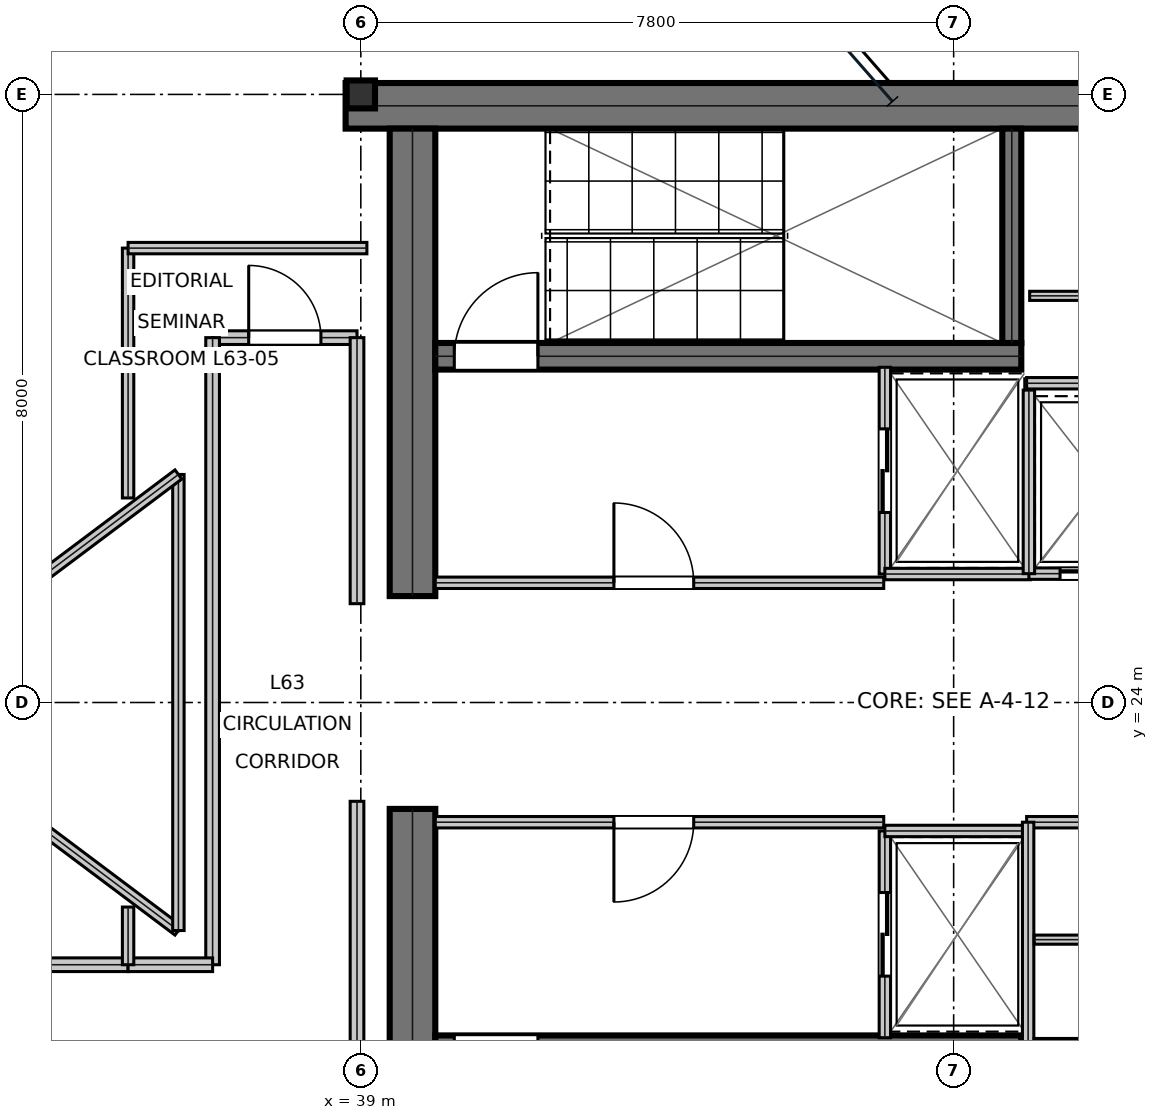
"""IFC4 building model, lengths in metres.
Left out: names, types, materials, properties, quantities, classifications, styles, units other than length and angle.
Written with IfcOpenShell. Run it as: python <this file> out.ifc"""

import sys

from ifc_helpers import new_model, si_unit, direction, frame, frame_2d, origin, origin_2d, place, context, subcontext, project, spatial, rectangle, i_section, extrude, element, fill, save


model = new_model("IFC4")
c1 = context("Model", 3, precision=1e-05, world=origin(), true_north=direction((0.0, 1.0)))
c2 = subcontext(c1, "Body", "Model", "MODEL_VIEW")
j1 = project(units=[si_unit("LENGTHUNIT", "METRE"), si_unit("PLANEANGLEUNIT", "RADIAN")], contexts=[c1])
p1 = place(None, origin())
s1 = spatial("IfcSite", under=j1, at=p1, CompositionType="ELEMENT")
p2 = place(p1, origin())
s2 = spatial("IfcBuilding", under=s1, at=p2, CompositionType="ELEMENT")
p3 = place(p2, frame((0.0, 0.0, 270.9)))
s3 = spatial("IfcBuildingStorey", under=s2, at=p3, CompositionType="ELEMENT", Elevation=270.9)
p4 = place(p3, frame((38.8, 31.85, 0.0), z_axis=(0.0, 0.0, 1.0), x_axis=(1.0, 0.0, 0.0)))
e1 = element("IfcWall", 1, at=p4, inside=s3, PredefinedType="SHEAR", context=c2, shape_type="SweptSolid", body=[
    extrude(rectangle(XDim=16.0, YDim=0.6, at=frame_2d((8.0, 0.0))), origin(), (0.0, 0.0, 1.0), 3.81),
])
for number, where, z_axis, x_axis in (
    (2, (39.68, 16.45, 0.0), (0.0, 0.0, 1.0), (0.0, 1.0, 0.0)),
    (3, (39.68, 25.4, 0.0), (0.0, 0.0, 1.0), (0.0, 1.0, 0.0)),
):
    element("IfcWall", number, at=place(p3, frame(where, z_axis=z_axis, x_axis=x_axis)), inside=s3, PredefinedType="SHEAR", context=c2, shape_type="SweptSolid", body=[
        extrude(rectangle(XDim=6.15, YDim=0.6, at=frame_2d((3.075, 0.0))), origin(), (0.0, 0.0, 1.0), 3.81),
    ])
p5 = place(p3, frame((39.98, 28.555, 0.0), z_axis=(0.0, 0.0, 1.0), x_axis=(1.0, 0.0, 0.0)))
e4 = element("IfcWall", 4, at=p5, inside=s3, PredefinedType="SHEAR", context=c2, shape_type="SweptSolid", body=[
    extrude(rectangle(XDim=7.71, YDim=0.35, at=frame_2d((3.855, 0.0))), origin(), (0.0, 0.0, 1.0), 3.81),
])
p6 = place(p5, frame((0.25, 0.0, 0.0)))
e5 = element("IfcOpeningElement", 5, at=p6, cuts=e4, PredefinedType="OPENING", context=c2, shape_type="SweptSolid", body=[
    extrude(rectangle(XDim=1.1, YDim=2.15, at=frame_2d((0.55, 1.075))), frame((0.0, 0.185, 0.0), z_axis=(0.0, -1.0, 0.0), x_axis=(1.0, 0.0, 0.0)), (0.0, 0.0, 1.0), 0.37),
])
p7 = place(p3, frame((39.98, 19.445, 0.0), z_axis=(0.0, 0.0, 1.0), x_axis=(1.0, 0.0, 0.0)))
e6 = element("IfcWall", 6, at=p7, inside=s3, PredefinedType="SHEAR", context=c2, shape_type="SweptSolid", body=[
    extrude(rectangle(XDim=7.71, YDim=0.35, at=frame_2d((3.855, 0.0))), origin(), (0.0, 0.0, 1.0), 3.81),
])
p8 = place(p7, frame((0.25, 0.0, 0.0)))
e7 = element("IfcOpeningElement", 7, at=p8, cuts=e6, PredefinedType="OPENING", context=c2, shape_type="SweptSolid", body=[
    extrude(rectangle(XDim=1.1, YDim=2.15, at=frame_2d((0.55, 1.075))), frame((0.0, 0.185, 0.0), z_axis=(0.0, -1.0, 0.0), x_axis=(1.0, 0.0, 0.0)), (0.0, 0.0, 1.0), 0.37),
])
p9 = place(p3, frame((47.565, 28.73, 0.0), z_axis=(0.0, 0.0, 1.0), x_axis=(0.0, 1.0, 0.0)))
e8 = element("IfcWall", 8, at=p9, inside=s3, PredefinedType="SHEAR", context=c2, shape_type="SweptSolid", body=[
    extrude(rectangle(XDim=2.82, YDim=0.25, at=frame_2d((1.41, 0.0))), origin(), (0.0, 0.0, 1.0), 3.81),
])
p10 = place(p3, frame((39.0, 32.0, 0.0), z_axis=(0.0, 0.0, 1.0), x_axis=(1.0, 0.0, 0.0)))
e9 = element("IfcColumn", 9, at=p10, inside=s3, PredefinedType="COLUMN", context=c2, shape_type="SweptSolid", body=[
    extrude(i_section(OverallWidth=0.373, OverallDepth=0.368, WebThickness=0.015, FlangeThickness=0.024, at=origin_2d()), origin(), (0.0, 0.0, 1.0), 4.044),
])
p11 = place(p3, frame((39.98, 25.575, 0.0), z_axis=(0.0, 0.0, 1.0), x_axis=(1.0, 0.0, 0.0)))
e10 = element("IfcWall", 10, at=p11, inside=s3, PredefinedType="PARTITIONING", context=c2, shape_type="SweptSolid", body=[
    extrude(rectangle(XDim=5.9, YDim=0.15, at=frame_2d((2.95, 0.0))), origin(), (0.0, 0.0, 1.0), 3.81),
])
p12 = place(p11, frame((2.35, 0.0, 0.0)))
e11 = element("IfcOpeningElement", 11, at=p12, cuts=e10, PredefinedType="OPENING", context=c2, shape_type="SweptSolid", body=[
    extrude(rectangle(XDim=1.05, YDim=2.15, at=frame_2d((0.525, 1.075))), frame((0.0, 0.085, 0.0), z_axis=(0.0, -1.0, 0.0), x_axis=(1.0, 0.0, 0.0)), (0.0, 0.0, 1.0), 0.17),
])
p13 = place(p3, frame((39.98, 22.425, 0.0), z_axis=(0.0, 0.0, 1.0), x_axis=(1.0, 0.0, 0.0)))
e12 = element("IfcWall", 12, at=p13, inside=s3, PredefinedType="PARTITIONING", context=c2, shape_type="SweptSolid", body=[
    extrude(rectangle(XDim=5.9, YDim=0.15, at=frame_2d((2.95, 0.0))), origin(), (0.0, 0.0, 1.0), 3.81),
])
p14 = place(p13, frame((2.35, 0.0, 0.0)))
e13 = element("IfcOpeningElement", 13, at=p14, cuts=e12, PredefinedType="OPENING", context=c2, shape_type="SweptSolid", body=[
    extrude(rectangle(XDim=1.05, YDim=2.15, at=frame_2d((0.525, 1.075))), frame((0.0, 0.085, 0.0), z_axis=(0.0, -1.0, 0.0), x_axis=(1.0, 0.0, 0.0)), (0.0, 0.0, 1.0), 0.17),
])
p15 = place(p3, frame((45.895, 25.69, 0.0), z_axis=(0.0, 0.0, 1.0), x_axis=(0.0, 1.0, 0.0)))
e14 = element("IfcWall", 14, at=p15, inside=s3, PredefinedType="PARTITIONING", context=c2, shape_type="SweptSolid", body=[
    extrude(rectangle(XDim=2.72, YDim=0.15, at=frame_2d((1.36, 0.0))), origin(), (0.0, 0.0, 1.0), 3.81),
])
p16 = place(p15, frame((0.81, 0.0, 0.0)))
e15 = element("IfcOpeningElement", 15, at=p16, cuts=e14, PredefinedType="OPENING", context=c2, shape_type="SweptSolid", body=[
    extrude(rectangle(XDim=1.1, YDim=2.15, at=frame_2d((0.55, 1.075))), frame((0.0, 0.085, 0.0), z_axis=(0.0, -1.0, 0.0), x_axis=(1.0, 0.0, 0.0)), (0.0, 0.0, 1.0), 0.17),
])
p17 = place(p3, frame((45.895, 25.69, 0.0), z_axis=(0.0, 0.0, 1.0), x_axis=(1.0, 0.0, 0.0)))
e16 = element("IfcWall", 16, at=p17, inside=s3, PredefinedType="PARTITIONING", context=c2, shape_type="SweptSolid", body=[
    extrude(rectangle(XDim=1.915, YDim=0.15, at=frame_2d((0.958, 0.0))), origin(), (0.0, 0.0, 1.0), 3.81),
])
p18 = place(p3, frame((45.895, 19.59, 0.0), z_axis=(0.0, 0.0, 1.0), x_axis=(0.0, 1.0, 0.0)))
e17 = element("IfcWall", 17, at=p18, inside=s3, PredefinedType="PARTITIONING", context=c2, shape_type="SweptSolid", body=[
    extrude(rectangle(XDim=2.72, YDim=0.15, at=frame_2d((1.36, 0.0))), origin(), (0.0, 0.0, 1.0), 3.81),
])
p19 = place(p18, frame((0.81, 0.0, 0.0)))
e18 = element("IfcOpeningElement", 18, at=p19, cuts=e17, PredefinedType="OPENING", context=c2, shape_type="SweptSolid", body=[
    extrude(rectangle(XDim=1.1, YDim=2.15, at=frame_2d((0.55, 1.075))), frame((0.0, 0.085, 0.0), z_axis=(0.0, -1.0, 0.0), x_axis=(1.0, 0.0, 0.0)), (0.0, 0.0, 1.0), 0.17),
])
p20 = place(p3, frame((45.895, 22.31, 0.0), z_axis=(0.0, 0.0, 1.0), x_axis=(1.0, 0.0, 0.0)))
e19 = element("IfcWall", 19, at=p20, inside=s3, PredefinedType="PARTITIONING", context=c2, shape_type="SweptSolid", body=[
    extrude(rectangle(XDim=1.915, YDim=0.15, at=frame_2d((0.958, 0.0))), origin(), (0.0, 0.0, 1.0), 3.81),
])
p21 = place(p3, frame((47.79, 25.695, 0.0), z_axis=(0.0, 0.0, 1.0), x_axis=(1.0, 0.0, 0.0)))
e20 = element("IfcWall", 20, at=p21, inside=s3, PredefinedType="PARTITIONING", context=c2, shape_type="SweptSolid", body=[
    extrude(rectangle(XDim=1.92, YDim=0.15, at=frame_2d((0.96, 0.0))), origin(), (0.0, 0.0, 1.0), 3.81),
])
p22 = place(p21, frame((0.41, 0.0, 0.0)))
e21 = element("IfcOpeningElement", 21, at=p22, cuts=e20, PredefinedType="OPENING", context=c2, shape_type="SweptSolid", body=[
    extrude(rectangle(XDim=1.1, YDim=2.15, at=frame_2d((0.55, 1.075))), frame((0.0, 0.085, 0.0), z_axis=(0.0, -1.0, 0.0), x_axis=(1.0, 0.0, 0.0)), (0.0, 0.0, 1.0), 0.17),
])
p23 = place(p3, frame((47.79, 25.695, 0.0), z_axis=(0.0, 0.0, 1.0), x_axis=(0.0, 1.0, 0.0)))
e22 = element("IfcWall", 22, at=p23, inside=s3, PredefinedType="PARTITIONING", context=c2, shape_type="SweptSolid", body=[
    extrude(rectangle(XDim=2.415, YDim=0.15, at=frame_2d((1.208, 0.0))), origin(), (0.0, 0.0, 1.0), 3.81),
])
p24 = place(p3, frame((47.76, 22.425, 0.0), z_axis=(0.0, 0.0, 1.0), x_axis=(1.0, 0.0, 0.0)))
e23 = element("IfcWall", 23, at=p24, inside=s3, PredefinedType="PARTITIONING", context=c2, shape_type="SweptSolid", body=[
    extrude(rectangle(XDim=1.96, YDim=0.15, at=frame_2d((0.98, 0.0))), origin(), (0.0, 0.0, 1.0), 3.81),
])
p25 = place(p3, frame((47.78, 16.45, 0.0), z_axis=(0.0, 0.0, 1.0), x_axis=(0.0, 1.0, 0.0)))
e24 = element("IfcWall", 24, at=p25, inside=s3, PredefinedType="PARTITIONING", context=c2, shape_type="SweptSolid", body=[
    extrude(rectangle(XDim=5.975, YDim=0.15, at=frame_2d((2.988, 0.0))), origin(), (0.0, 0.0, 1.0), 3.81),
])
for number, where, z_axis, x_axis in (
    (25, (47.86, 19.52, 0.0), (0.0, 0.0, 1.0), (1.0, 0.0, 0.0)),
    (26, (47.86, 20.88, 0.0), (0.0, 0.0, 1.0), (1.0, 0.0, 0.0)),
):
    element("IfcWall", number, at=place(p3, frame(where, z_axis=z_axis, x_axis=x_axis)), inside=s3, PredefinedType="PARTITIONING", context=c2, shape_type="SweptSolid", body=[
        extrude(rectangle(XDim=1.76, YDim=0.12, at=frame_2d((0.88, 0.0))), origin(), (0.0, 0.0, 1.0), 3.81),
    ])
p26 = place(p3, frame((47.76, 28.2, 0.0), z_axis=(0.0, 0.0, 1.0), x_axis=(1.0, 0.0, 0.0)))
e27 = element("IfcWall", 27, at=p26, inside=s3, PredefinedType="PARTITIONING", context=c2, shape_type="SweptSolid", body=[
    extrude(rectangle(XDim=2.04, YDim=0.15, at=frame_2d((1.02, 0.0))), origin(), (0.0, 0.0, 1.0), 3.81),
])
p27 = place(p3, frame((47.8, 29.35, 0.0), z_axis=(0.0, 0.0, 1.0), x_axis=(1.0, 0.0, 0.0)))
e28 = element("IfcWall", 28, at=p27, inside=s3, PredefinedType="PARTITIONING", context=c2, shape_type="SweptSolid", body=[
    extrude(rectangle(XDim=5.86, YDim=0.12, at=frame_2d((2.93, 0.0))), origin(), (0.0, 0.0, 1.0), 3.81),
])
p28 = place(p27, frame((2.6, 0.0, 0.0)))
e29 = element("IfcOpeningElement", 29, at=p28, cuts=e28, PredefinedType="OPENING", context=c2, shape_type="SweptSolid", body=[
    extrude(rectangle(XDim=0.85, YDim=2.15, at=frame_2d((0.425, 1.075))), frame((0.0, 0.07, 0.0), z_axis=(0.0, -1.0, 0.0), x_axis=(1.0, 0.0, 0.0)), (0.0, 0.0, 1.0), 0.14),
])
p29 = place(p3, frame((37.05, 28.8, 0.0), z_axis=(0.0, 0.0, 1.0), x_axis=(1.0, 0.0, 0.0)))
e30 = element("IfcWall", 30, at=p29, inside=s3, PredefinedType="SOLIDWALL", context=c2, shape_type="SweptSolid", body=[
    extrude(rectangle(XDim=1.9, YDim=0.18, at=frame_2d((0.95, 0.0))), origin(), (0.0, 0.0, 1.0), 3.81),
])
p30 = place(p29, frame((0.475, 0.0, 0.0)))
e31 = element("IfcOpeningElement", 31, at=p30, cuts=e30, PredefinedType="OPENING", context=c2, shape_type="SweptSolid", body=[
    extrude(rectangle(XDim=0.95, YDim=2.15, at=frame_2d((0.475, 1.075))), frame((0.0, 0.1, 0.0), z_axis=(0.0, -1.0, 0.0), x_axis=(1.0, 0.0, 0.0)), (0.0, 0.0, 1.0), 0.2),
])
p31 = place(p3, frame((25.895, 20.55, 0.0), z_axis=(0.0, 0.0, 1.0), x_axis=(1.0, 0.0, 0.0)))
e32 = element("IfcWall", 32, at=p31, inside=s3, PredefinedType="SOLIDWALL", context=c2, shape_type="SweptSolid", body=[
    extrude(rectangle(XDim=10.043, YDim=0.18, at=frame_2d((5.021, 0.0))), origin(), (0.0, 0.0, 1.0), 3.27),
])
p32 = place(p31, frame((4.572, 0.0, 0.0)))
e33 = element("IfcOpeningElement", 33, at=p32, cuts=e32, PredefinedType="OPENING", context=c2, shape_type="SweptSolid", body=[
    extrude(rectangle(XDim=0.9, YDim=2.15, at=frame_2d((0.45, 1.075))), frame((0.0, 0.1, 0.0), z_axis=(0.0, -1.0, 0.0), x_axis=(1.0, 0.0, 0.0)), (0.0, 0.0, 1.0), 0.2),
])
p33 = place(p3, frame((38.95, 18.8, 0.0), z_axis=(0.0, 0.0, 1.0), x_axis=(0.0, 1.0, 0.0)))
e34 = element("IfcWall", 34, at=p33, inside=s3, PredefinedType="SOLIDWALL", context=c2, shape_type="SweptSolid", body=[
    extrude(rectangle(XDim=3.9, YDim=0.18, at=frame_2d((1.95, 0.0))), origin(), (0.0, 0.0, 1.0), 3.54),
])
p34 = place(p3, frame((37.05, 20.55, 0.0), z_axis=(0.0, 0.0, 1.0), x_axis=(0.0, 1.0, 0.0)))
e35 = element("IfcWall", 35, at=p34, inside=s3, PredefinedType="SOLIDWALL", context=c2, shape_type="SweptSolid", body=[
    extrude(rectangle(XDim=8.25, YDim=0.18, at=frame_2d((4.125, 0.0))), origin(), (0.0, 0.0, 1.0), 3.54),
])
p35 = place(p3, frame((38.95, 25.3, 0.0), z_axis=(0.0, 0.0, 1.0), x_axis=(0.0, 1.0, 0.0)))
e36 = element("IfcWall", 36, at=p35, inside=s3, PredefinedType="SOLIDWALL", context=c2, shape_type="SweptSolid", body=[
    extrude(rectangle(XDim=3.5, YDim=0.18, at=frame_2d((1.75, 0.0))), origin(), (0.0, 0.0, 1.0), 3.54),
])
p36 = place(p3, frame((35.938, 20.55, 0.0), z_axis=(0.0, 0.0, 1.0), x_axis=(1.0, 0.0, 0.0)))
e37 = element("IfcWall", 37, at=p36, inside=s3, PredefinedType="SOLIDWALL", context=c2, shape_type="SweptSolid", body=[
    extrude(rectangle(XDim=1.112, YDim=0.18, at=frame_2d((0.556, 0.0))), origin(), (0.0, 0.0, 1.0), 3.54),
])
p37 = place(p3, frame((35.938, 26.691, 0.0), z_axis=(0.0, 0.0, 1.0), x_axis=(0.0, 1.0, 0.0)))
e38 = element("IfcWall", 38, at=p37, inside=s3, PredefinedType="MOVABLE", context=c2, shape_type="SweptSolid", body=[
    extrude(rectangle(XDim=3.287, YDim=0.15, at=frame_2d((1.644, 0.0))), origin(), (0.0, 0.0, 1.0), 3.54),
])
p38 = place(p3, frame((35.938, 29.978, 0.0), z_axis=(0.0, 0.0, 1.0), x_axis=(1.0, 0.0, 0.0)))
e39 = element("IfcWall", 39, at=p38, inside=s3, PredefinedType="MOVABLE", context=c2, shape_type="SweptSolid", body=[
    extrude(rectangle(XDim=3.142, YDim=0.15, at=frame_2d((1.571, 0.0))), origin(), (0.0, 0.0, 1.0), 3.54),
])
p39 = place(p3, frame((35.938, 20.55, 0.0), z_axis=(0.0, 0.0, 1.0), x_axis=(0.0, 1.0, 0.0)))
e40 = element("IfcWall", 40, at=p39, inside=s3, PredefinedType="MOVABLE", context=c2, shape_type="SweptSolid", body=[
    extrude(rectangle(XDim=0.759, YDim=0.15, at=frame_2d((0.379, 0.0))), origin(), (0.0, 0.0, 1.0), 3.81),
])
p40 = place(p3, frame((32.6, 24.0, 0.0), z_axis=(0.0, 0.0, 1.0), x_axis=(0.8, -0.6, 0.0)))
e41 = element("IfcWall", 41, at=p40, inside=s3, PredefinedType="MOVABLE", context=c2, shape_type="SweptSolid", body=[
    extrude(rectangle(XDim=5.0, YDim=0.15, at=frame_2d((2.5, 0.0))), origin(), (0.0, 0.0, 1.0), 3.81),
])
p41 = place(p3, frame((36.6, 21.0, 0.0), z_axis=(0.0, 0.0, 1.0), x_axis=(0.0, 1.0, 0.0)))
e42 = element("IfcWall", 42, at=p41, inside=s3, PredefinedType="MOVABLE", context=c2, shape_type="SweptSolid", body=[
    extrude(rectangle(XDim=6.0, YDim=0.15, at=frame_2d((3.0, 0.0))), origin(), (0.0, 0.0, 1.0), 3.81),
])
p42 = place(p3, frame((36.6, 27.0, 0.0), z_axis=(0.0, 0.0, 1.0), x_axis=(-0.8, -0.6, 0.0)))
e43 = element("IfcWall", 43, at=p42, inside=s3, PredefinedType="MOVABLE", context=c2, shape_type="SweptSolid", body=[
    extrude(rectangle(XDim=5.0, YDim=0.15, at=frame_2d((2.5, 0.0))), origin(), (0.0, 0.0, 1.0), 3.81),
])
p43 = place(p12, origin())
e44 = element("IfcDoor", 44, at=p43, inside=s3, OperationType="SINGLE_SWING_LEFT", PredefinedType="DOOR", context=c2, shape_type="SweptSolid", body=[
    extrude(rectangle(XDim=1.05, YDim=2.15, at=frame_2d((0.525, 1.075))), frame((0.0, 0.025, 0.0), z_axis=(0.0, -1.0, 0.0), x_axis=(1.0, 0.0, 0.0)), (0.0, 0.0, 1.0), 0.05),
])
fill(e11, e44)
p44 = place(p14, frame((1.05, 0.0, 0.0), z_axis=(0.0, 0.0, 1.0), x_axis=(-1.0, 0.0, 0.0)))
e45 = element("IfcDoor", 45, at=p44, inside=s3, OperationType="SINGLE_SWING_RIGHT", PredefinedType="DOOR", context=c2, shape_type="SweptSolid", body=[
    extrude(rectangle(XDim=1.05, YDim=2.15, at=frame_2d((0.525, 1.075))), frame((0.0, 0.025, 0.0), z_axis=(0.0, -1.0, 0.0), x_axis=(1.0, 0.0, 0.0)), (0.0, 0.0, 1.0), 0.05),
])
fill(e13, e45)
p45 = place(p16, frame((1.1, 0.0, 0.0), z_axis=(0.0, 0.0, 1.0), x_axis=(-1.0, 0.0, 0.0)))
e46 = element("IfcDoor", 46, at=p45, inside=s3, OperationType="DOUBLE_DOOR_SLIDING", PredefinedType="DOOR", context=c2, shape_type="SweptSolid", body=[
    extrude(rectangle(XDim=1.1, YDim=2.15, at=frame_2d((0.55, 1.075))), frame((0.0, 0.025, 0.0), z_axis=(0.0, -1.0, 0.0), x_axis=(1.0, 0.0, 0.0)), (0.0, 0.0, 1.0), 0.05),
])
fill(e15, e46)
p46 = place(p19, frame((1.1, 0.0, 0.0), z_axis=(0.0, 0.0, 1.0), x_axis=(-1.0, 0.0, 0.0)))
e47 = element("IfcDoor", 47, at=p46, inside=s3, OperationType="DOUBLE_DOOR_SLIDING", PredefinedType="DOOR", context=c2, shape_type="SweptSolid", body=[
    extrude(rectangle(XDim=1.1, YDim=2.15, at=frame_2d((0.55, 1.075))), frame((0.0, 0.025, 0.0), z_axis=(0.0, -1.0, 0.0), x_axis=(1.0, 0.0, 0.0)), (0.0, 0.0, 1.0), 0.05),
])
fill(e18, e47)
p47 = place(p22, frame((1.1, 0.0, 0.0), z_axis=(0.0, 0.0, 1.0), x_axis=(-1.0, 0.0, 0.0)))
e48 = element("IfcDoor", 48, at=p47, inside=s3, OperationType="DOUBLE_DOOR_SLIDING", PredefinedType="DOOR", context=c2, shape_type="SweptSolid", body=[
    extrude(rectangle(XDim=1.1, YDim=2.15, at=frame_2d((0.55, 1.075))), frame((0.0, 0.025, 0.0), z_axis=(0.0, -1.0, 0.0), x_axis=(1.0, 0.0, 0.0)), (0.0, 0.0, 1.0), 0.05),
])
fill(e21, e48)
p48 = place(p30, origin())
e49 = element("IfcDoor", 49, at=p48, inside=s3, OperationType="SINGLE_SWING_LEFT", PredefinedType="DOOR", context=c2, shape_type="SweptSolid", body=[
    extrude(rectangle(XDim=0.95, YDim=2.15, at=frame_2d((0.475, 1.075))), frame((0.0, 0.025, 0.0), z_axis=(0.0, -1.0, 0.0), x_axis=(1.0, 0.0, 0.0)), (0.0, 0.0, 1.0), 0.05),
])
fill(e31, e49)
p49 = place(p6, origin())
e50 = element("IfcDoor", 50, at=p49, inside=s3, OperationType="SINGLE_SWING_RIGHT", PredefinedType="DOOR", context=c2, shape_type="SweptSolid", body=[
    extrude(rectangle(XDim=1.1, YDim=2.15, at=frame_2d((0.55, 1.075))), frame((0.0, 0.025, 0.0), z_axis=(0.0, -1.0, 0.0), x_axis=(1.0, 0.0, 0.0)), (0.0, 0.0, 1.0), 0.05),
])
fill(e5, e50)
save(model, sys.argv[1])
